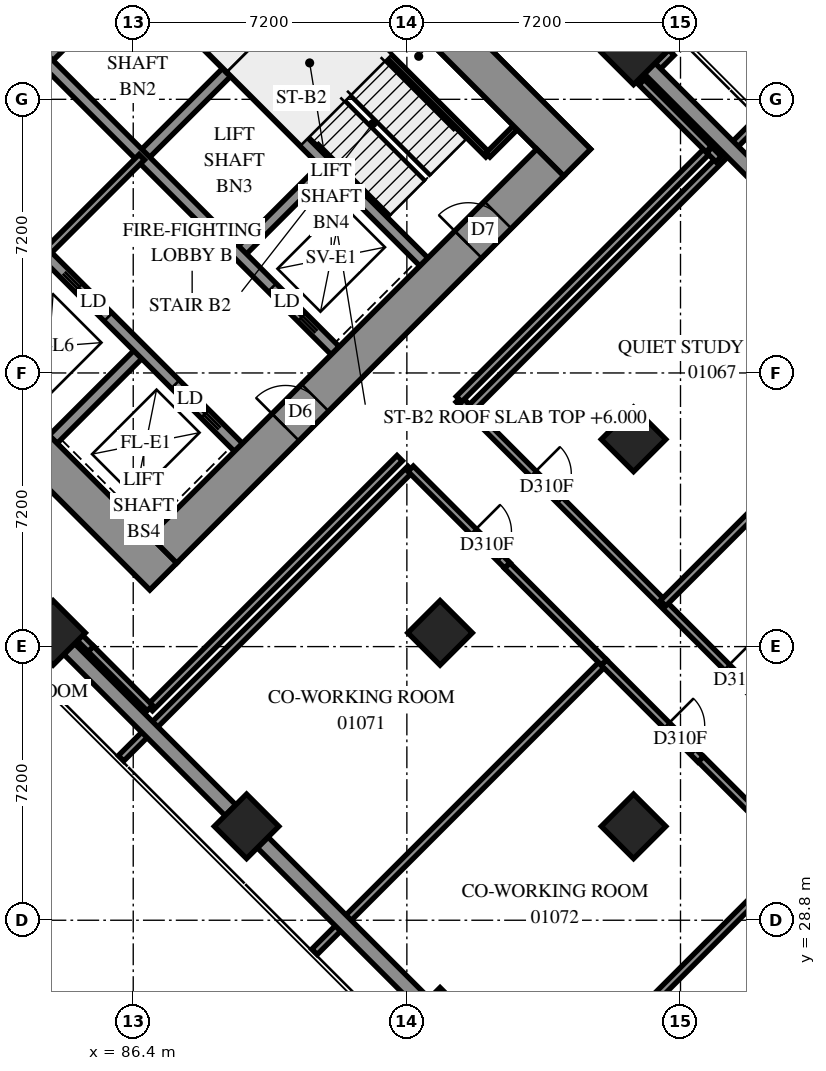
"""IFC4 building model, lengths in metres.
Left out: names, types, materials, properties, quantities, classifications, styles, units other than length and angle.
Written with IfcOpenShell. Run it as: python <this file> out.ifc"""

import sys

from ifc_helpers import new_model, si_unit, direction, frame, frame_2d, origin, origin_2d, place, context, subcontext, project, spatial, rectangle, extrude, element, fill, save


model = new_model("IFC4")
c1 = context("Model", 3, precision=1e-05, world=origin(), true_north=direction((0.0, 1.0)))
c2 = subcontext(c1, "Body", "Model", "MODEL_VIEW")
j1 = project(units=[si_unit("LENGTHUNIT", "METRE"), si_unit("PLANEANGLEUNIT", "RADIAN")], contexts=[c1])
p1 = place(None, origin())
s1 = spatial("IfcSite", under=j1, at=p1, CompositionType="ELEMENT")
p2 = place(p1, origin())
s2 = spatial("IfcBuilding", under=s1, at=p2, CompositionType="ELEMENT")
p3 = place(p2, frame((0.0, 0.0, 6.0)))
s3 = spatial("IfcBuildingStorey", under=s2, at=p3, CompositionType="ELEMENT", Elevation=6.0)
for number, where, z_axis, x_axis in (
    (1, (99.565, 51.635, 0.0), (0.0, 0.0, 1.0), (0.707, -0.707, 0.0)),
    (2, (84.291, 36.362, 0.0), (0.0, 0.0, 1.0), (0.707, -0.707, 0.0)),
    (3, (99.565, 41.453, 0.0), (0.0, 0.0, 1.0), (0.707, -0.707, 0.0)),
    (4, (94.474, 36.362, 0.0), (0.0, 0.0, 1.0), (0.707, -0.707, 0.0)),
    (5, (89.382, 31.271, 0.0), (0.0, 0.0, 1.0), (0.707, -0.707, 0.0)),
    (6, (99.565, 31.271, 0.0), (0.0, 0.0, 1.0), (0.707, -0.707, 0.0)),
    (7, (94.474, 26.18, 0.0), (0.0, 0.0, 1.0), (0.707, -0.707, 0.0)),
):
    element("IfcColumn", number, at=place(p3, frame(where, z_axis=z_axis, x_axis=x_axis)), inside=s3, PredefinedType="COLUMN", context=c2, shape_type="SweptSolid", body=[
        extrude(rectangle(XDim=1.2, YDim=1.2, at=origin_2d()), origin(), (0.0, 0.0, 1.0), 3.8),
    ])
p4 = place(p3, frame((75.594, 49.443, -0.4), z_axis=(0.0, 0.0, 1.0), x_axis=(0.7071037324, -0.70710983, 0.0)))
e8 = element("IfcWall", 8, at=p4, inside=s3, PredefinedType="SHEAR", context=c2, shape_type="SweptSolid", body=[
    extrude(rectangle(XDim=16.4, YDim=1.0, at=frame_2d((8.2, 0.0))), origin(), (0.0, 0.0, 1.0), 3.5),
])
p5 = place(p3, frame((86.483, 60.333, -0.4), z_axis=(0.0, 0.0, 1.0), x_axis=(0.70710983, -0.7071037324, 0.0)))
e9 = element("IfcWall", 9, at=p5, inside=s3, PredefinedType="SHEAR", context=c2, shape_type="SweptSolid", body=[
    extrude(rectangle(XDim=16.4, YDim=1.0, at=frame_2d((8.2, 0.0))), origin(), (0.0, 0.0, 1.0), 3.5),
])
p6 = place(p5, frame((11.0, 0.0, 0.4)))
e10 = element("IfcOpeningElement", 10, at=p6, cuts=e9, PredefinedType="OPENING", context=c2, shape_type="SweptSolid", body=[
    extrude(rectangle(XDim=0.8, YDim=2.1, at=frame_2d((0.4, 1.05))), frame((0.0, 0.51, 0.0), z_axis=(0.0, -1.0, 0.0), x_axis=(1.0, 0.0, 0.0)), (0.0, 0.0, 1.0), 1.02),
])
p7 = place(p3, frame((76.301, 49.443, -0.4), z_axis=(0.0, 0.0, 1.0), x_axis=(0.7071067812, 0.7071067812, 0.0)))
e11 = element("IfcWall", 11, at=p7, inside=s3, PredefinedType="SHEAR", context=c2, shape_type="SweptSolid", body=[
    extrude(rectangle(XDim=14.4, YDim=1.0, at=frame_2d((7.2, 0.0))), origin(), (0.0, 0.0, 1.0), 3.5),
])
p8 = place(p7, frame((4.55, 0.0, 0.4)))
e12 = element("IfcOpeningElement", 12, at=p8, cuts=e11, PredefinedType="OPENING", context=c2, shape_type="SweptSolid", body=[
    extrude(rectangle(XDim=1.1, YDim=2.1, at=frame_2d((0.55, 1.05))), frame((0.0, 0.51, 0.0), z_axis=(0.0, -1.0, 0.0), x_axis=(1.0, 0.0, 0.0)), (0.0, 0.0, 1.0), 1.02),
])
p9 = place(p7, frame((11.35, 0.0, 0.4)))
e13 = element("IfcOpeningElement", 13, at=p9, cuts=e11, PredefinedType="OPENING", context=c2, shape_type="SweptSolid", body=[
    extrude(rectangle(XDim=1.1, YDim=2.1, at=frame_2d((0.55, 1.05))), frame((0.0, 0.51, 0.0), z_axis=(0.0, -1.0, 0.0), x_axis=(1.0, 0.0, 0.0)), (0.0, 0.0, 1.0), 1.02),
])
p10 = place(p3, frame((87.19, 38.554, -0.4), z_axis=(0.0, 0.0, 1.0), x_axis=(0.707103309, 0.7071102534, 0.0)))
e14 = element("IfcWall", 14, at=p10, inside=s3, PredefinedType="SHEAR", context=c2, shape_type="SweptSolid", body=[
    extrude(rectangle(XDim=14.4, YDim=1.0, at=frame_2d((7.2, 0.0))), origin(), (0.0, 0.0, 1.0), 3.5),
])
p11 = place(p10, frame((4.55, 0.0, 0.4)))
e15 = element("IfcOpeningElement", 15, at=p11, cuts=e14, PredefinedType="OPENING", context=c2, shape_type="SweptSolid", body=[
    extrude(rectangle(XDim=1.1, YDim=2.1, at=frame_2d((0.55, 1.05))), frame((0.0, 0.51, 0.0), z_axis=(0.0, -1.0, 0.0), x_axis=(1.0, 0.0, 0.0)), (0.0, 0.0, 1.0), 1.02),
])
p12 = place(p10, frame((11.35, 0.0, 0.4)))
e16 = element("IfcOpeningElement", 16, at=p12, cuts=e14, PredefinedType="OPENING", context=c2, shape_type="SweptSolid", body=[
    extrude(rectangle(XDim=1.1, YDim=2.1, at=frame_2d((0.55, 1.05))), frame((0.0, 0.51, 0.0), z_axis=(0.0, -1.0, 0.0), x_axis=(1.0, 0.0, 0.0)), (0.0, 0.0, 1.0), 1.02),
])
p13 = place(p3, frame((84.079, 51.423, 0.0), z_axis=(0.0, 0.0, 1.0), x_axis=(0.7071219326, 0.7070916295, 0.0)))
e17 = element("IfcWall", 17, at=p13, inside=s3, PredefinedType="SOLIDWALL", context=c2, shape_type="SweptSolid", body=[
    extrude(rectangle(XDim=3.3, YDim=0.3, at=frame_2d((1.65, 0.0))), origin(), (0.0, 0.0, 1.0), 3.8),
])
p14 = place(p3, frame((86.625, 48.878, 0.0), z_axis=(0.0, 0.0, 1.0), x_axis=(0.7071067812, 0.7071067812, 0.0)))
e18 = element("IfcWall", 18, at=p14, inside=s3, PredefinedType="SOLIDWALL", context=c2, shape_type="SweptSolid", body=[
    extrude(rectangle(XDim=3.3, YDim=0.3, at=frame_2d((1.65, 0.0))), origin(), (0.0, 0.0, 1.0), 3.8),
])
p15 = place(p3, frame((84.291, 41.453, 0.0), z_axis=(0.0, 0.0, 1.0), x_axis=(0.7071067812, 0.7071067812, 0.0)))
e19 = element("IfcWall", 19, at=p15, inside=s3, PredefinedType="SOLIDWALL", context=c2, shape_type="SweptSolid", body=[
    extrude(rectangle(XDim=3.3, YDim=0.3, at=frame_2d((1.65, 0.0))), origin(), (0.0, 0.0, 1.0), 3.8),
])
p16 = place(p3, frame((89.17, 46.332, 0.0), z_axis=(0.0, 0.0, 1.0), x_axis=(0.7071067812, 0.7071067812, 0.0)))
e20 = element("IfcWall", 20, at=p16, inside=s3, PredefinedType="SOLIDWALL", context=c2, shape_type="SweptSolid", body=[
    extrude(rectangle(XDim=3.3, YDim=0.3, at=frame_2d((1.65, 0.0))), origin(), (0.0, 0.0, 1.0), 3.8),
])
p17 = place(p3, frame((78.988, 51.423, 0.0), z_axis=(0.0, 0.0, 1.0), x_axis=(0.7071067812, -0.7071067812, 0.0)))
e21 = element("IfcWall", 21, at=p17, inside=s3, PredefinedType="SOLIDWALL", context=c2, shape_type="SweptSolid", body=[
    extrude(rectangle(XDim=14.4, YDim=0.3, at=frame_2d((7.2, 0.0))), origin(), (0.0, 0.0, 1.0), 3.8),
])
p18 = place(p17, frame((1.25, 0.0, 0.0)))
e22 = element("IfcOpeningElement", 22, at=p18, cuts=e21, PredefinedType="OPENING", context=c2, shape_type="SweptSolid", body=[
    extrude(rectangle(XDim=1.1, YDim=2.1, at=frame_2d((0.55, 1.05))), frame((0.0, 0.16, 0.0), z_axis=(0.0, -1.0, 0.0), x_axis=(1.0, 0.0, 0.0)), (0.0, 0.0, 1.0), 0.32),
])
p19 = place(p17, frame((4.85, 0.0, 0.0)))
e23 = element("IfcOpeningElement", 23, at=p19, cuts=e21, PredefinedType="OPENING", context=c2, shape_type="SweptSolid", body=[
    extrude(rectangle(XDim=1.1, YDim=2.1, at=frame_2d((0.55, 1.05))), frame((0.0, 0.16, 0.0), z_axis=(0.0, -1.0, 0.0), x_axis=(1.0, 0.0, 0.0)), (0.0, 0.0, 1.0), 0.32),
])
p20 = place(p17, frame((8.45, 0.0, 0.0)))
e24 = element("IfcOpeningElement", 24, at=p20, cuts=e21, PredefinedType="OPENING", context=c2, shape_type="SweptSolid", body=[
    extrude(rectangle(XDim=1.1, YDim=2.1, at=frame_2d((0.55, 1.05))), frame((0.0, 0.16, 0.0), z_axis=(0.0, -1.0, 0.0), x_axis=(1.0, 0.0, 0.0)), (0.0, 0.0, 1.0), 0.32),
])
p21 = place(p17, frame((12.05, 0.0, 0.0)))
e25 = element("IfcOpeningElement", 25, at=p21, cuts=e21, PredefinedType="OPENING", context=c2, shape_type="SweptSolid", body=[
    extrude(rectangle(XDim=1.1, YDim=2.1, at=frame_2d((0.55, 1.05))), frame((0.0, 0.16, 0.0), z_axis=(0.0, -1.0, 0.0), x_axis=(1.0, 0.0, 0.0)), (0.0, 0.0, 1.0), 0.32),
])
p22 = place(p3, frame((81.534, 53.969, 0.0), z_axis=(0.0, 0.0, 1.0), x_axis=(0.707103309, -0.7071102534, 0.0)))
e26 = element("IfcWall", 26, at=p22, inside=s3, PredefinedType="SOLIDWALL", context=c2, shape_type="SweptSolid", body=[
    extrude(rectangle(XDim=14.4, YDim=0.3, at=frame_2d((7.2, 0.0))), origin(), (0.0, 0.0, 1.0), 3.8),
])
p23 = place(p22, frame((12.05, 0.0, 0.0)))
e27 = element("IfcOpeningElement", 27, at=p23, cuts=e26, PredefinedType="OPENING", context=c2, shape_type="SweptSolid", body=[
    extrude(rectangle(XDim=1.1, YDim=2.1, at=frame_2d((0.55, 1.05))), frame((0.0, 0.16, 0.0), z_axis=(0.0, -1.0, 0.0), x_axis=(1.0, 0.0, 0.0)), (0.0, 0.0, 1.0), 0.32),
])
for number, where, z_axis, x_axis in (
    (28, (83.867, 56.302, 0.0), (0.0, 0.0, 1.0), (0.707, -0.707, 0.0)),
    (29, (88.958, 51.211, 0.0), (0.0, 0.0, 1.0), (0.707, -0.707, 0.0)),
):
    element("IfcWall", number, at=place(p3, frame(where, z_axis=z_axis, x_axis=x_axis)), inside=s3, PredefinedType="SOLIDWALL", context=c2, shape_type="SweptSolid", body=[
        extrude(rectangle(XDim=7.2, YDim=0.3, at=frame_2d((3.6, 0.0))), origin(), (0.0, 0.0, 1.0), 3.8),
    ])
p24 = place(p3, frame((88.958, 51.211, 0.0), z_axis=(0.0, 0.0, 1.0), x_axis=(0.7071067812, 0.7071067812, 0.0)))
e30 = element("IfcWall", 30, at=p24, inside=s3, PredefinedType="SOLIDWALL", context=c2, shape_type="SweptSolid", body=[
    extrude(rectangle(XDim=4.2, YDim=0.3, at=frame_2d((2.1, 0.0))), origin(), (0.0, 0.0, 1.0), 3.8),
])
p25 = place(p3, frame((91.313, 53.354, 0.0), z_axis=(0.0, 0.0, 1.0), x_axis=(0.7071147811, -0.7070987812, 0.0)))
e31 = element("IfcWall", 31, at=p25, inside=s3, PredefinedType="PARTITIONING", context=c2, shape_type="SweptSolid", body=[
    extrude(rectangle(XDim=6.25, YDim=0.15, at=frame_2d((3.125, 0.0))), origin(), (0.0, 0.0, 1.0), 3.8),
])
p26 = place(p3, frame((95.732, 48.934, 0.0), z_axis=(0.0, 0.0, 1.0), x_axis=(0.7071067812, 0.7071067812, 0.0)))
e32 = element("IfcWall", 32, at=p26, inside=s3, PredefinedType="PARTITIONING", context=c2, shape_type="SweptSolid", body=[
    extrude(rectangle(XDim=1.02, YDim=0.15, at=frame_2d((0.51, 0.0))), origin(), (0.0, 0.0, 1.0), 3.8),
])
p27 = place(p3, frame((84.079, 46.332, 0.0), z_axis=(0.0, 0.0, 1.0), x_axis=(0.7071067812, 0.7071067812, 0.0)))
e33 = element("IfcWall", 33, at=p27, inside=s3, PredefinedType="PARTITIONING", context=c2, shape_type="SweptSolid", body=[
    extrude(rectangle(XDim=3.6, YDim=0.2, at=frame_2d((1.8, 0.0))), origin(), (0.0, 0.0, 1.0), 3.8),
])
p28 = place(p3, frame((94.967, 42.509, 0.0), z_axis=(0.0, 0.0, 1.0), x_axis=(0.7071067812, -0.7071067812, 0.0)))
e34 = element("IfcWall", 34, at=p28, inside=s3, PredefinedType="PARTITIONING", context=c2, shape_type="SweptSolid", body=[
    extrude(rectangle(XDim=14.798, YDim=0.2, at=frame_2d((7.399, 0.0))), origin(), (0.0, 0.0, 1.0), 3.8),
])
p29 = place(p28, frame((2.772, 0.0, 0.0)))
e35 = element("IfcOpeningElement", 35, at=p29, cuts=e34, PredefinedType="OPENING", context=c2, shape_type="SweptSolid", body=[
    extrude(rectangle(XDim=1.0, YDim=2.1, at=frame_2d((0.5, 1.05))), frame((0.0, 0.11, 0.0), z_axis=(0.0, -1.0, 0.0), x_axis=(1.0, 0.0, 0.0)), (0.0, 0.0, 1.0), 0.22),
])
p30 = place(p28, frame((9.972, 0.0, 0.0)))
e36 = element("IfcOpeningElement", 36, at=p30, cuts=e34, PredefinedType="OPENING", context=c2, shape_type="SweptSolid", body=[
    extrude(rectangle(XDim=1.0, YDim=2.1, at=frame_2d((0.5, 1.05))), frame((0.0, 0.11, 0.0), z_axis=(0.0, -1.0, 0.0), x_axis=(1.0, 0.0, 0.0)), (0.0, 0.0, 1.0), 0.22),
])
p31 = place(p3, frame((108.973, 25.405, 0.0), z_axis=(0.0, 0.0, 1.0), x_axis=(-0.7072456519, 0.7069678831, 0.0)))
e37 = element("IfcWall", 37, at=p31, inside=s3, PredefinedType="PARTITIONING", context=c2, shape_type="SweptSolid", body=[
    extrude(rectangle(XDim=10.8, YDim=0.2, at=frame_2d((5.4, 0.0))), origin(), (0.0, 0.0, 1.0), 3.8),
])
p32 = place(p31, frame((3.863, 0.0, 0.0)))
e38 = element("IfcOpeningElement", 38, at=p32, cuts=e37, PredefinedType="OPENING", context=c2, shape_type="SweptSolid", body=[
    extrude(rectangle(XDim=1.0, YDim=2.1, at=frame_2d((0.5, 1.05))), frame((0.0, 0.11, 0.0), z_axis=(0.0, -1.0, 0.0), x_axis=(1.0, 0.0, 0.0)), (0.0, 0.0, 1.0), 0.22),
])
for number, where, z_axis, x_axis in (
    (39, (100.342, 37.14, 0.0), (0.0, 0.0, 1.0), (0.707, 0.707, 0.0)),
    (40, (86.079, 33.061, 0.0), (0.0, 0.0, 1.0), (0.707, 0.707, 0.0)),
    (41, (96.261, 22.877, 0.0), (0.0, 0.0, 1.0), (0.707, 0.707, 0.0)),
    (42, (91.17, 27.968, 0.0), (0.0, 0.0, 1.0), (0.707, 0.707, 0.0)),
    (43, (95.25, 42.232, 0.0), (0.0, 0.0, 1.0), (0.707, 0.707, 0.0)),
):
    element("IfcWall", number, at=place(p3, frame(where, z_axis=z_axis, x_axis=x_axis)), inside=s3, PredefinedType="PARTITIONING", context=c2, shape_type="SweptSolid", body=[
        extrude(rectangle(XDim=10.771, YDim=0.2, at=frame_2d((5.385, 0.0))), origin(), (0.0, 0.0, 1.0), 3.8),
    ])
p33 = place(p3, frame((86.836, 34.382, 0.0), z_axis=(0.0, 0.0, 1.0), x_axis=(0.7071067812, 0.7071067812, 0.0)))
e44 = element("IfcWall", 44, at=p33, inside=s3, PredefinedType="PARTITIONING", context=c2, shape_type="SweptSolid", body=[
    extrude(rectangle(XDim=9.3, YDim=0.2, at=frame_2d((4.65, 0.0))), origin(), (0.0, 0.0, 1.0), 3.8),
])
p34 = place(p3, frame((94.972, 42.512, 0.0), z_axis=(0.0, 0.0, 1.0), x_axis=(0.7069992283, 0.7072143178, 0.0)))
e45 = element("IfcWall", 45, at=p34, inside=s3, PredefinedType="PARTITIONING", context=c2, shape_type="SweptSolid", body=[
    extrude(rectangle(XDim=9.299, YDim=0.2, at=frame_2d((4.649, 0.0))), origin(), (0.0, 0.0, 1.0), 3.8),
])
p35 = place(p3, frame((79.865, 41.347, 0.0), z_axis=(0.0, 0.0, 1.0), x_axis=(0.7071067812, -0.7071067812, 0.0)))
e46 = element("IfcWall", 46, at=p35, inside=s3, PredefinedType="PARTITIONING", context=c2, shape_type="SweptSolid", body=[
    extrude(rectangle(XDim=6.206, YDim=0.2, at=frame_2d((3.103, 0.0))), origin(), (0.0, 0.0, 1.0), 3.8),
])
p36 = place(p35, frame((4.692, 0.0, 0.0)))
e47 = element("IfcOpeningElement", 47, at=p36, cuts=e46, PredefinedType="OPENING", context=c2, shape_type="SweptSolid", body=[
    extrude(rectangle(XDim=1.0, YDim=2.1, at=frame_2d((0.5, 1.05))), frame((0.0, 0.11, 0.0), z_axis=(0.0, -1.0, 0.0), x_axis=(1.0, 0.0, 0.0)), (0.0, 0.0, 1.0), 0.22),
])
p37 = place(p3, frame((93.699, 40.679, 0.0), z_axis=(0.0, 0.0, 1.0), x_axis=(0.7071067812, -0.7071067812, 0.0)))
e48 = element("IfcWall", 48, at=p37, inside=s3, PredefinedType="PARTITIONING", context=c2, shape_type="SweptSolid", body=[
    extrude(rectangle(XDim=3.601, YDim=0.2, at=frame_2d((1.8, 0.0))), origin(), (0.0, 0.0, 1.0), 3.8),
])
p38 = place(p37, frame((2.338, 0.0, 0.0)))
e49 = element("IfcOpeningElement", 49, at=p38, cuts=e48, PredefinedType="OPENING", context=c2, shape_type="SweptSolid", body=[
    extrude(rectangle(XDim=1.0, YDim=2.1, at=frame_2d((0.5, 1.05))), frame((0.0, 0.11, 0.0), z_axis=(0.0, -1.0, 0.0), x_axis=(1.0, 0.0, 0.0)), (0.0, 0.0, 1.0), 0.22),
])
p39 = place(p3, frame((98.783, 35.581, 0.0), z_axis=(0.0, 0.0, 1.0), x_axis=(0.7071067812, -0.7071067812, 0.0)))
e50 = element("IfcWall", 50, at=p39, inside=s3, PredefinedType="PARTITIONING", context=c2, shape_type="SweptSolid", body=[
    extrude(rectangle(XDim=3.601, YDim=0.2, at=frame_2d((1.8, 0.0))), origin(), (0.0, 0.0, 1.0), 3.8),
])
p40 = place(p39, frame((2.338, 0.0, 0.0)))
e51 = element("IfcOpeningElement", 51, at=p40, cuts=e50, PredefinedType="OPENING", context=c2, shape_type="SweptSolid", body=[
    extrude(rectangle(XDim=1.0, YDim=2.1, at=frame_2d((0.5, 1.05))), frame((0.0, 0.11, 0.0), z_axis=(0.0, -1.0, 0.0), x_axis=(1.0, 0.0, 0.0)), (0.0, 0.0, 1.0), 0.22),
])
p41 = place(p3, frame((96.241, 38.129, 0.0), z_axis=(0.0, 0.0, 1.0), x_axis=(0.7068288851, -0.7073845681, 0.0)))
e52 = element("IfcWall", 52, at=p41, inside=s3, PredefinedType="PARTITIONING", context=c2, shape_type="SweptSolid", body=[
    extrude(rectangle(XDim=3.599, YDim=0.2, at=frame_2d((1.8, 0.0))), origin(), (0.0, 0.0, 1.0), 3.8),
])
p42 = place(p3, frame((99.777, 50.851, 0.0), z_axis=(0.0, 0.0, 1.0), x_axis=(0.7071067812, -0.7071067812, 0.0)))
e53 = element("IfcWall", 53, at=p42, inside=s3, PredefinedType="PARTITIONING", context=c2, shape_type="SweptSolid", body=[
    extrude(rectangle(XDim=2.495, YDim=0.2, at=frame_2d((1.247, 0.0))), origin(), (0.0, 0.0, 1.0), 3.8),
])
p43 = place(p3, frame((85.284, 35.94, 0.0), z_axis=(0.0, 0.0, 1.0), x_axis=(0.706651904, -0.7075613659, 0.0)))
e54 = element("IfcWall", 54, at=p43, inside=s3, PredefinedType="PARTITIONING", context=c2, shape_type="SweptSolid", body=[
    extrude(rectangle(XDim=2.199, YDim=0.2, at=frame_2d((1.1, 0.0))), origin(), (0.0, 0.0, 1.0), 3.8),
])
for number, where, z_axis, x_axis in (
    (55, (100.161, 52.023, 0.0), (0.0, 0.0, 1.0), (0.707, -0.707, 0.0)),
    (56, (100.167, 51.235, 0.0), (0.0, 0.0, 1.0), (0.707, 0.707, 0.0)),
):
    element("IfcWall", number, at=place(p3, frame(where, z_axis=z_axis, x_axis=x_axis)), inside=s3, PredefinedType="PARTITIONING", context=c2, shape_type="SweptSolid", body=[
        extrude(rectangle(XDim=0.557, YDim=0.2, at=frame_2d((0.279, 0.0))), origin(), (0.0, 0.0, 1.0), 3.8),
    ])
p44 = place(p3, frame((84.895, 36.331, 0.0), z_axis=(0.0, 0.0, 1.0), x_axis=(0.7071067812, -0.7071067812, 0.0)))
e57 = element("IfcWall", 57, at=p44, inside=s3, PredefinedType="PARTITIONING", context=c2, shape_type="SweptSolid", body=[
    extrude(rectangle(XDim=0.551, YDim=0.2, at=frame_2d((0.276, 0.0))), origin(), (0.0, 0.0, 1.0), 3.8),
])
p45 = place(p3, frame((101.562, 49.066, 0.0), z_axis=(0.0, 0.0, 1.0), x_axis=(0.7071067812, -0.7071067812, 0.0)))
e58 = element("IfcWall", 58, at=p45, inside=s3, PredefinedType="PARTITIONING", context=c2, shape_type="SweptSolid", body=[
    extrude(rectangle(XDim=0.342, YDim=0.2, at=frame_2d((0.171, 0.0))), origin(), (0.0, 0.0, 1.0), 3.8),
])
p46 = place(p6, origin())
e59 = element("IfcDoor", 59, at=p46, inside=s3, OperationType="SINGLE_SWING_RIGHT", PredefinedType="DOOR", context=c2, shape_type="SweptSolid", body=[
    extrude(rectangle(XDim=0.8, YDim=2.1, at=frame_2d((0.4, 1.05))), frame((0.0, -0.44, 0.0), z_axis=(0.0, -1.0, 0.0), x_axis=(1.0, 0.0, 0.0)), (0.0, 0.0, 1.0), 0.05),
])
fill(e10, e59)
p47 = place(p11, origin())
e60 = element("IfcDoor", 60, at=p47, inside=s3, OperationType="DOUBLE_DOOR_SINGLE_SWING", PredefinedType="DOOR", context=c2, shape_type="SweptSolid", body=[
    extrude(rectangle(XDim=1.1, YDim=2.1, at=frame_2d((0.55, 1.05))), frame((0.0, 0.025, 0.0), z_axis=(0.0, -1.0, 0.0), x_axis=(1.0, 0.0, 0.0)), (0.0, 0.0, 1.0), 0.05),
])
fill(e15, e60)
p48 = place(p12, origin())
e61 = element("IfcDoor", 61, at=p48, inside=s3, OperationType="SINGLE_SWING_RIGHT", PredefinedType="DOOR", context=c2, shape_type="SweptSolid", body=[
    extrude(rectangle(XDim=1.1, YDim=2.1, at=frame_2d((0.55, 1.05))), frame((0.0, 0.025, 0.0), z_axis=(0.0, -1.0, 0.0), x_axis=(1.0, 0.0, 0.0)), (0.0, 0.0, 1.0), 0.05),
])
fill(e16, e61)
p49 = place(p20, origin())
e62 = element("IfcDoor", 62, at=p49, inside=s3, OperationType="SLIDING_TO_LEFT", PredefinedType="DOOR", context=c2, shape_type="SweptSolid", body=[
    extrude(rectangle(XDim=1.1, YDim=2.1, at=frame_2d((0.55, 1.05))), frame((0.0, 0.025, 0.0), z_axis=(0.0, -1.0, 0.0), x_axis=(1.0, 0.0, 0.0)), (0.0, 0.0, 1.0), 0.05),
])
fill(e24, e62)
p50 = place(p21, origin())
e63 = element("IfcDoor", 63, at=p50, inside=s3, OperationType="SLIDING_TO_RIGHT", PredefinedType="DOOR", context=c2, shape_type="SweptSolid", body=[
    extrude(rectangle(XDim=1.1, YDim=2.1, at=frame_2d((0.55, 1.05))), frame((0.0, 0.025, 0.0), z_axis=(0.0, -1.0, 0.0), x_axis=(1.0, 0.0, 0.0)), (0.0, 0.0, 1.0), 0.05),
])
fill(e25, e63)
p51 = place(p23, origin())
e64 = element("IfcDoor", 64, at=p51, inside=s3, OperationType="SLIDING_TO_RIGHT", PredefinedType="DOOR", context=c2, shape_type="SweptSolid", body=[
    extrude(rectangle(XDim=1.1, YDim=2.1, at=frame_2d((0.55, 1.05))), frame((0.0, 0.025, 0.0), z_axis=(0.0, -1.0, 0.0), x_axis=(1.0, 0.0, 0.0)), (0.0, 0.0, 1.0), 0.05),
])
fill(e27, e64)
p52 = place(p29, origin())
e65 = element("IfcDoor", 65, at=p52, inside=s3, OperationType="SINGLE_SWING_RIGHT", PredefinedType="DOOR", context=c2, shape_type="SweptSolid", body=[
    extrude(rectangle(XDim=1.0, YDim=2.1, at=frame_2d((0.5, 1.05))), frame((0.0, 0.025, 0.0), z_axis=(0.0, -1.0, 0.0), x_axis=(1.0, 0.0, 0.0)), (0.0, 0.0, 1.0), 0.05),
])
fill(e35, e65)
p53 = place(p30, origin())
e66 = element("IfcDoor", 66, at=p53, inside=s3, OperationType="SINGLE_SWING_RIGHT", PredefinedType="DOOR", context=c2, shape_type="SweptSolid", body=[
    extrude(rectangle(XDim=1.0, YDim=2.1, at=frame_2d((0.5, 1.05))), frame((0.0, 0.025, 0.0), z_axis=(0.0, -1.0, 0.0), x_axis=(1.0, 0.0, 0.0)), (0.0, 0.0, 1.0), 0.05),
])
fill(e36, e66)
p54 = place(p38, origin())
e67 = element("IfcDoor", 67, at=p54, inside=s3, OperationType="SINGLE_SWING_LEFT", PredefinedType="DOOR", context=c2, shape_type="SweptSolid", body=[
    extrude(rectangle(XDim=1.0, YDim=2.1, at=frame_2d((0.5, 1.05))), frame((0.0, 0.025, 0.0), z_axis=(0.0, -1.0, 0.0), x_axis=(1.0, 0.0, 0.0)), (0.0, 0.0, 1.0), 0.05),
])
fill(e49, e67)
p55 = place(p40, origin())
e68 = element("IfcDoor", 68, at=p55, inside=s3, OperationType="SINGLE_SWING_LEFT", PredefinedType="DOOR", context=c2, shape_type="SweptSolid", body=[
    extrude(rectangle(XDim=1.0, YDim=2.1, at=frame_2d((0.5, 1.05))), frame((0.0, 0.025, 0.0), z_axis=(0.0, -1.0, 0.0), x_axis=(1.0, 0.0, 0.0)), (0.0, 0.0, 1.0), 0.05),
])
fill(e51, e68)
save(model, sys.argv[1])
